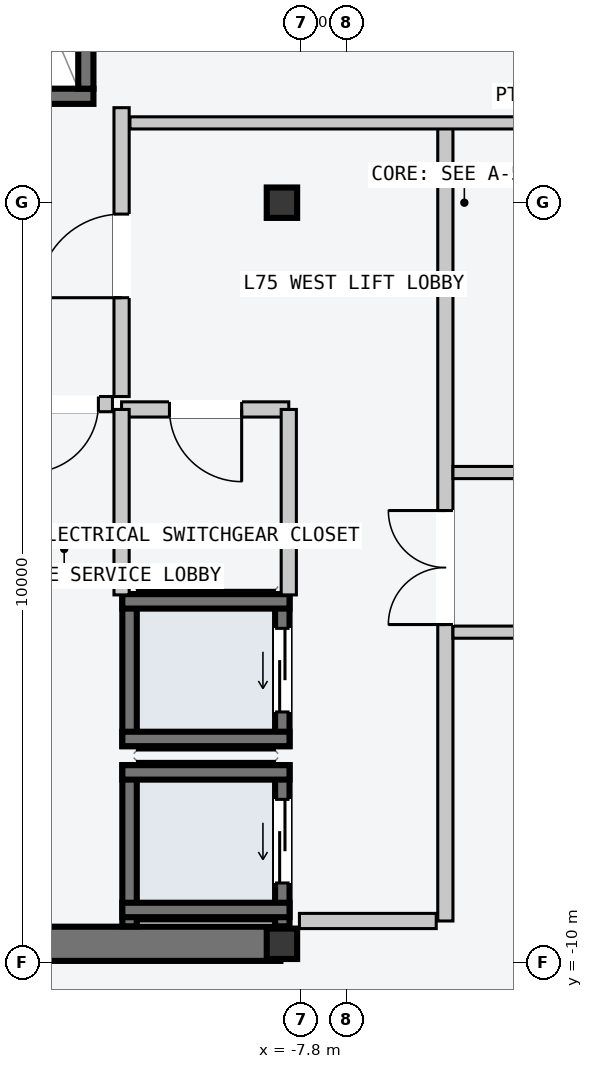
"""IFC4 building model, lengths in metres.
Left out: names, types, materials, properties, quantities, classifications, styles, units other than length and angle.
Written with IfcOpenShell. Run it as: python <this file> out.ifc"""

import sys

from ifc_helpers import new_model, si_unit, direction, frame, frame_2d, origin, origin_2d, place, context, subcontext, project, spatial, rectangle, i_section, extrude, element, fill, save


model = new_model("IFC4")
c1 = context("Model", 3, precision=1e-05, world=origin(), true_north=direction((0.0, 1.0)))
c2 = subcontext(c1, "Body", "Model", "MODEL_VIEW")
j1 = project(units=[si_unit("LENGTHUNIT", "METRE"), si_unit("PLANEANGLEUNIT", "RADIAN")], contexts=[c1])
p1 = place(None, origin())
s1 = spatial("IfcSite", under=j1, at=p1, CompositionType="ELEMENT")
p2 = place(p1, origin())
s2 = spatial("IfcBuilding", under=s1, at=p2, CompositionType="ELEMENT")
p3 = place(p2, frame((0.0, 0.0, 284.4)))
s3 = spatial("IfcBuildingStorey", under=s2, at=p3, CompositionType="ELEMENT", Elevation=284.4)
p4 = place(p3, frame((-14.53, -9.75, -0.2), z_axis=(0.0, 0.0, 1.0), x_axis=(1.0, 0.0, 0.0)))
e1 = element("IfcWall", 1, at=p4, inside=s3, PredefinedType="SHEAR", context=c2, shape_type="SweptSolid", body=[
    extrude(rectangle(XDim=6.46, YDim=0.45, at=frame_2d((3.23, 0.0))), origin(), (0.0, 0.0, 1.0), 4.8),
])
p5 = place(p3, frame((-14.25, 1.4, -0.2), z_axis=(0.0, 0.0, 1.0), x_axis=(1.0, 0.0, 0.0)))
e2 = element("IfcWall", 2, at=p5, inside=s3, PredefinedType="SOLIDWALL", context=c2, shape_type="SweptSolid", body=[
    extrude(rectangle(XDim=3.72, YDim=0.2, at=frame_2d((1.86, 0.0))), origin(), (0.0, 0.0, 1.0), 4.8),
])
p6 = place(p5, frame((1.5, 0.0, 0.2)))
e3 = element("IfcOpeningElement", 3, at=p6, cuts=e2, PredefinedType="OPENING", context=c2, shape_type="SweptSolid", body=[
    extrude(rectangle(XDim=1.12, YDim=2.18, at=frame_2d((0.56, 1.09))), frame((0.0, 0.11, 0.0), z_axis=(0.0, -1.0, 0.0), x_axis=(1.0, 0.0, 0.0)), (0.0, 0.0, 1.0), 0.22),
])
p7 = place(p3, frame((-10.63, 1.5, -0.2), z_axis=(0.0, 0.0, 1.0), x_axis=(0.0, 1.0, 0.0)))
e4 = element("IfcWall", 4, at=p7, inside=s3, PredefinedType="SOLIDWALL", context=c2, shape_type="SweptSolid", body=[
    extrude(rectangle(XDim=7.8, YDim=0.2, at=frame_2d((3.9, 0.0))), origin(), (0.0, 0.0, 1.0), 4.8),
])
for number, where, z_axis, x_axis in (
    (5, (-8.05, -9.75, 0.0), (0.0, 0.0, 1.0), (1.0, 0.0, 0.0)),
    (6, (-8.05, 0.0, 0.0), (0.0, 0.0, 1.0), (1.0, 0.0, 0.0)),
):
    element("IfcColumn", number, at=place(p3, frame(where, z_axis=z_axis, x_axis=x_axis)), inside=s3, PredefinedType="COLUMN", context=c2, shape_type="SweptSolid", body=[
        extrude(i_section(OverallWidth=0.4, OverallDepth=0.4, WebThickness=0.013, FlangeThickness=0.021, at=origin_2d()), origin(), (0.0, 0.0, 1.0), 4.8),
    ])
p8 = place(p3, frame((-8.045, -9.52, -0.2), z_axis=(0.0, 0.0, 1.0), x_axis=(0.0, 1.0, 0.0)))
e7 = element("IfcWall", 7, at=p8, inside=s3, PredefinedType="SOLIDWALL", context=c2, shape_type="SweptSolid", body=[
    extrude(rectangle(XDim=2.12, YDim=0.19, at=frame_2d((1.06, 0.0))), origin(), (0.0, 0.0, 1.0), 4.8),
])
p9 = place(p8, frame((0.57, 0.0, 0.2)))
e8 = element("IfcOpeningElement", 8, at=p9, cuts=e7, PredefinedType="OPENING", context=c2, shape_type="SweptSolid", body=[
    extrude(rectangle(XDim=1.1, YDim=2.2, at=frame_2d((0.55, 1.1))), frame((0.0, 0.105, 0.0), z_axis=(0.0, -1.0, 0.0), x_axis=(1.0, 0.0, 0.0)), (0.0, 0.0, 1.0), 0.21),
])
p10 = place(p3, frame((-10.055, -9.52, -0.2), z_axis=(0.0, 0.0, 1.0), x_axis=(0.0, 1.0, 0.0)))
e9 = element("IfcWall", 9, at=p10, inside=s3, PredefinedType="SOLIDWALL", context=c2, shape_type="SweptSolid", body=[
    extrude(rectangle(XDim=2.12, YDim=0.19, at=frame_2d((1.06, 0.0))), origin(), (0.0, 0.0, 1.0), 4.8),
])
for number, where, z_axis, x_axis in (
    (10, (-10.15, -7.495, -0.2), (0.0, 0.0, 1.0), (1.0, 0.0, 0.0)),
    (11, (-10.15, -9.305, -0.2), (0.0, 0.0, 1.0), (1.0, 0.0, 0.0)),
):
    element("IfcWall", number, at=place(p3, frame(where, z_axis=z_axis, x_axis=x_axis)), inside=s3, PredefinedType="SOLIDWALL", context=c2, shape_type="SweptSolid", body=[
        extrude(rectangle(XDim=2.2, YDim=0.19, at=frame_2d((1.1, 0.0))), origin(), (0.0, 0.0, 1.0), 4.8),
    ])
p11 = place(p3, frame((-8.045, -7.15, -0.2), z_axis=(0.0, 0.0, 1.0), x_axis=(0.0, 1.0, 0.0)))
e12 = element("IfcWall", 12, at=p11, inside=s3, PredefinedType="SOLIDWALL", context=c2, shape_type="SweptSolid", body=[
    extrude(rectangle(XDim=2.0, YDim=0.19, at=frame_2d((1.0, 0.0))), origin(), (0.0, 0.0, 1.0), 4.8),
])
p12 = place(p11, frame((0.45, 0.0, 0.2)))
e13 = element("IfcOpeningElement", 13, at=p12, cuts=e12, PredefinedType="OPENING", context=c2, shape_type="SweptSolid", body=[
    extrude(rectangle(XDim=1.1, YDim=2.2, at=frame_2d((0.55, 1.1))), frame((0.0, 0.105, 0.0), z_axis=(0.0, -1.0, 0.0), x_axis=(1.0, 0.0, 0.0)), (0.0, 0.0, 1.0), 0.21),
])
p13 = place(p3, frame((-10.055, -7.15, -0.2), z_axis=(0.0, 0.0, 1.0), x_axis=(0.0, 1.0, 0.0)))
e14 = element("IfcWall", 14, at=p13, inside=s3, PredefinedType="SOLIDWALL", context=c2, shape_type="SweptSolid", body=[
    extrude(rectangle(XDim=2.0, YDim=0.19, at=frame_2d((1.0, 0.0))), origin(), (0.0, 0.0, 1.0), 4.8),
])
for number, where, z_axis, x_axis in (
    (15, (-10.15, -5.245, -0.2), (0.0, 0.0, 1.0), (1.0, 0.0, 0.0)),
    (16, (-10.15, -7.055, -0.2), (0.0, 0.0, 1.0), (1.0, 0.0, 0.0)),
):
    element("IfcWall", number, at=place(p3, frame(where, z_axis=z_axis, x_axis=x_axis)), inside=s3, PredefinedType="SOLIDWALL", context=c2, shape_type="SweptSolid", body=[
        extrude(rectangle(XDim=2.2, YDim=0.19, at=frame_2d((1.1, 0.0))), origin(), (0.0, 0.0, 1.0), 4.8),
    ])
p14 = place(p3, frame((-5.9, -9.45, 0.0), z_axis=(0.0, 0.0, 1.0), x_axis=(0.0, 1.0, 0.0)))
e17 = element("IfcWall", 17, at=p14, inside=s3, PredefinedType="PARTITIONING", context=c2, shape_type="SweptSolid", body=[
    extrude(rectangle(XDim=10.5, YDim=0.2, at=frame_2d((5.25, 0.0))), origin(), (0.0, 0.0, 1.0), 4.6),
])
p15 = place(p14, frame((3.9, 0.0, 0.0)))
e18 = element("IfcOpeningElement", 18, at=p15, cuts=e17, PredefinedType="OPENING", context=c2, shape_type="SweptSolid", body=[
    extrude(rectangle(XDim=1.5, YDim=2.2, at=frame_2d((0.75, 1.1))), frame((0.0, 0.11, 0.0), z_axis=(0.0, -1.0, 0.0), x_axis=(1.0, 0.0, 0.0)), (0.0, 0.0, 1.0), 0.22),
])
p16 = place(p3, frame((-6.02, -9.45, 0.0), z_axis=(0.0, 0.0, 1.0), x_axis=(-1.0, 0.0, 0.0)))
e19 = element("IfcWall", 19, at=p16, inside=s3, PredefinedType="PARTITIONING", context=c2, shape_type="SweptSolid", body=[
    extrude(rectangle(XDim=1.8, YDim=0.2, at=frame_2d((0.9, 0.0))), origin(), (0.0, 0.0, 1.0), 4.6),
])
p17 = place(p3, frame((-10.16, -2.55, 0.0), z_axis=(0.0, 0.0, 1.0), x_axis=(0.0, 1.0, 0.0)))
e20 = element("IfcWall", 20, at=p17, inside=s3, PredefinedType="PARTITIONING", context=c2, shape_type="SweptSolid", body=[
    extrude(rectangle(XDim=3.8, YDim=0.2, at=frame_2d((1.9, 0.0))), origin(), (0.0, 0.0, 1.0), 4.6),
])
p18 = place(p17, frame((1.3, 0.0, 0.0)))
e21 = element("IfcOpeningElement", 21, at=p18, cuts=e20, PredefinedType="OPENING", context=c2, shape_type="SweptSolid", body=[
    extrude(rectangle(XDim=1.1, YDim=2.15, at=frame_2d((0.55, 1.075))), frame((0.0, 0.11, 0.0), z_axis=(0.0, -1.0, 0.0), x_axis=(1.0, 0.0, 0.0)), (0.0, 0.0, 1.0), 0.22),
])
p19 = place(p3, frame((-10.28, -2.65, 0.0), z_axis=(0.0, 0.0, 1.0), x_axis=(-1.0, 0.0, 0.0)))
e22 = element("IfcWall", 22, at=p19, inside=s3, PredefinedType="PARTITIONING", context=c2, shape_type="SweptSolid", body=[
    extrude(rectangle(XDim=1.27, YDim=0.2, at=frame_2d((0.635, 0.0))), origin(), (0.0, 0.0, 1.0), 4.6),
])
p20 = place(p19, frame((0.185, 0.0, 0.0)))
e23 = element("IfcOpeningElement", 23, at=p20, cuts=e22, PredefinedType="OPENING", context=c2, shape_type="SweptSolid", body=[
    extrude(rectangle(XDim=0.9, YDim=2.15, at=frame_2d((0.45, 1.075))), frame((0.0, 0.11, 0.0), z_axis=(0.0, -1.0, 0.0), x_axis=(1.0, 0.0, 0.0)), (0.0, 0.0, 1.0), 0.22),
])
p21 = place(p3, frame((-7.96, -2.72, 0.0), z_axis=(0.0, 0.0, 1.0), x_axis=(-1.0, 0.0, 0.0)))
e24 = element("IfcWall", 24, at=p21, inside=s3, PredefinedType="PARTITIONING", context=c2, shape_type="SweptSolid", body=[
    extrude(rectangle(XDim=2.2, YDim=0.2, at=frame_2d((1.1, 0.0))), origin(), (0.0, 0.0, 1.0), 4.6),
])
p22 = place(p21, frame((0.62, 0.0, 0.0)))
e25 = element("IfcOpeningElement", 25, at=p22, cuts=e24, PredefinedType="OPENING", context=c2, shape_type="SweptSolid", body=[
    extrude(rectangle(XDim=0.95, YDim=2.1, at=frame_2d((0.475, 1.05))), frame((0.0, 0.11, 0.0), z_axis=(0.0, -1.0, 0.0), x_axis=(1.0, 0.0, 0.0)), (0.0, 0.0, 1.0), 0.22),
])
for number, where, z_axis, x_axis in (
    (26, (-7.96, -5.16, 0.0), (0.0, 0.0, 1.0), (0.0, 1.0, 0.0)),
    (27, (-10.16, -5.16, 0.0), (0.0, 0.0, 1.0), (0.0, 1.0, 0.0)),
):
    element("IfcWall", number, at=place(p3, frame(where, z_axis=z_axis, x_axis=x_axis)), inside=s3, PredefinedType="PARTITIONING", context=c2, shape_type="SweptSolid", body=[
        extrude(rectangle(XDim=2.44, YDim=0.2, at=frame_2d((1.22, 0.0))), origin(), (0.0, 0.0, 1.0), 4.6),
    ])
p23 = place(p3, frame((-10.05, 1.05, 0.0), z_axis=(0.0, 0.0, 1.0), x_axis=(1.0, 0.0, 0.0)))
e28 = element("IfcWall", 28, at=p23, inside=s3, PredefinedType="PARTITIONING", context=c2, shape_type="SweptSolid", body=[
    extrude(rectangle(XDim=10.54, YDim=0.16, at=frame_2d((5.27, 0.0))), origin(), (0.0, 0.0, 1.0), 4.6),
])
for number, where, z_axis, x_axis in (
    (29, (-5.8, -3.55, 0.0), (0.0, 0.0, 1.0), (1.0, 0.0, 0.0)),
    (30, (-5.8, -5.65, 0.0), (0.0, 0.0, 1.0), (1.0, 0.0, 0.0)),
):
    element("IfcWall", number, at=place(p3, frame(where, z_axis=z_axis, x_axis=x_axis)), inside=s3, PredefinedType="PARTITIONING", context=c2, shape_type="SweptSolid", body=[
        extrude(rectangle(XDim=6.29, YDim=0.16, at=frame_2d((3.145, 0.0))), origin(), (0.0, 0.0, 1.0), 4.6),
    ])
p24 = place(p9, origin())
e31 = element("IfcDoor", 31, at=p24, inside=s3, OperationType="SLIDING_TO_LEFT", PredefinedType="DOOR", context=c2, shape_type="SweptSolid", body=[
    extrude(rectangle(XDim=1.1, YDim=2.2, at=frame_2d((0.55, 1.1))), frame((0.0, 0.025, 0.0), z_axis=(0.0, -1.0, 0.0), x_axis=(1.0, 0.0, 0.0)), (0.0, 0.0, 1.0), 0.05),
])
fill(e8, e31)
p25 = place(p12, origin())
e32 = element("IfcDoor", 32, at=p25, inside=s3, OperationType="SLIDING_TO_LEFT", PredefinedType="DOOR", context=c2, shape_type="SweptSolid", body=[
    extrude(rectangle(XDim=1.1, YDim=2.2, at=frame_2d((0.55, 1.1))), frame((0.0, 0.025, 0.0), z_axis=(0.0, -1.0, 0.0), x_axis=(1.0, 0.0, 0.0)), (0.0, 0.0, 1.0), 0.05),
])
fill(e13, e32)
p26 = place(p15, origin())
e33 = element("IfcDoor", 33, at=p26, inside=s3, OperationType="DOUBLE_DOOR_SINGLE_SWING", PredefinedType="DOOR", context=c2, shape_type="SweptSolid", body=[
    extrude(rectangle(XDim=1.5, YDim=2.2, at=frame_2d((0.75, 1.1))), frame((0.0, 0.025, 0.0), z_axis=(0.0, -1.0, 0.0), x_axis=(1.0, 0.0, 0.0)), (0.0, 0.0, 1.0), 0.05),
])
fill(e18, e33)
p27 = place(p18, origin())
e34 = element("IfcDoor", 34, at=p27, inside=s3, OperationType="SINGLE_SWING_LEFT", PredefinedType="DOOR", context=c2, shape_type="SweptSolid", body=[
    extrude(rectangle(XDim=1.1, YDim=2.15, at=frame_2d((0.55, 1.075))), frame((0.0, 0.025, 0.0), z_axis=(0.0, -1.0, 0.0), x_axis=(1.0, 0.0, 0.0)), (0.0, 0.0, 1.0), 0.05),
])
fill(e21, e34)
p28 = place(p20, origin())
e35 = element("IfcDoor", 35, at=p28, inside=s3, OperationType="SINGLE_SWING_RIGHT", PredefinedType="DOOR", context=c2, shape_type="SweptSolid", body=[
    extrude(rectangle(XDim=0.9, YDim=2.15, at=frame_2d((0.45, 1.075))), frame((0.0, 0.025, 0.0), z_axis=(0.0, -1.0, 0.0), x_axis=(1.0, 0.0, 0.0)), (0.0, 0.0, 1.0), 0.05),
])
fill(e23, e35)
p29 = place(p22, origin())
e36 = element("IfcDoor", 36, at=p29, inside=s3, OperationType="SINGLE_SWING_LEFT", PredefinedType="DOOR", context=c2, shape_type="SweptSolid", body=[
    extrude(rectangle(XDim=0.95, YDim=2.1, at=frame_2d((0.475, 1.05))), frame((0.0, 0.025, 0.0), z_axis=(0.0, -1.0, 0.0), x_axis=(1.0, 0.0, 0.0)), (0.0, 0.0, 1.0), 0.05),
])
fill(e25, e36)
save(model, sys.argv[1])
